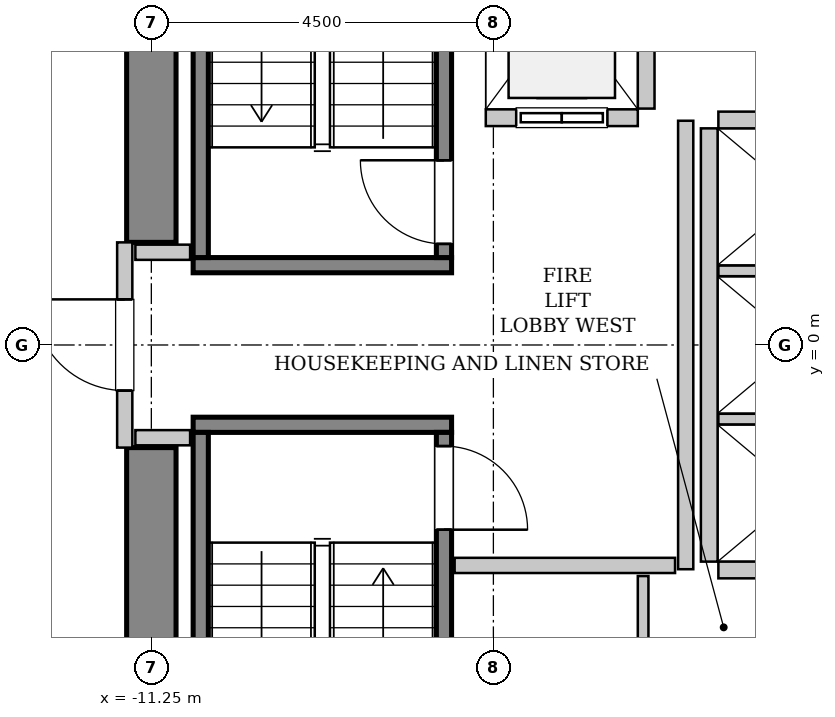
"""IFC4 building model, lengths in metres.
Left out: names, types, materials, properties, quantities, classifications, styles, units other than length and angle.
Written with IfcOpenShell. Run it as: python <this file> out.ifc"""

import sys

from ifc_helpers import new_model, si_unit, direction, frame, frame_2d, origin, place, context, subcontext, project, spatial, rectangle, extrude, source, transform, mapped, element, fill, save


model = new_model("IFC4")
c1 = context("Model", 3, precision=1e-05, world=origin(), true_north=direction((0.0, 1.0)))
c2 = subcontext(c1, "Body", "Model", "MODEL_VIEW")
j1 = project(units=[si_unit("LENGTHUNIT", "METRE"), si_unit("PLANEANGLEUNIT", "RADIAN")], contexts=[c1])
p1 = place(None, origin())
s1 = spatial("IfcSite", under=j1, at=p1, CompositionType="ELEMENT")
p2 = place(p1, origin())
s2 = spatial("IfcBuilding", under=s1, at=p2, CompositionType="ELEMENT")
p3 = place(p2, frame((0.0, 0.0, 55.8)))
s3 = spatial("IfcBuildingStorey", under=s2, at=p3, CompositionType="ELEMENT", Elevation=55.8)
m1 = source(origin(), c2, "Body", "SweptSolid", [
    extrude(rectangle(XDim=7.325, YDim=0.65, at=frame_2d((3.663, 0.0))), origin(), (0.0, 0.0, 1.0), 3.8),
])
for number, where, z_axis, x_axis in (
    (1, (-11.25, -8.675, 0.0), (0.0, 0.0, 1.0), (0.0, 1.0, 0.0)),
    (2, (-11.25, 1.35, 0.0), (0.0, 0.0, 1.0), (0.0, 1.0, 0.0)),
):
    element("IfcWall", number, at=place(p3, frame(where, z_axis=z_axis, x_axis=x_axis)), inside=s3, PredefinedType="SHEAR", context=c2, shape_type="MappedRepresentation", body=[
        mapped(m1, transform((0.0, 0.0, 0.0), x_axis=(1.0, 0.0, 0.0), y_axis=(0.0, 1.0, 0.0), z_axis=(0.0, 0.0, 1.0), scale=1.0)),
    ])
m2 = source(origin(), c2, "Body", "SweptSolid", [
    extrude(rectangle(XDim=3.4, YDim=0.2, at=frame_2d((1.7, 0.0))), origin(), (0.0, 0.0, 1.0), 3.8),
])
p4 = place(p3, frame((-7.3, 1.05, 0.0), z_axis=(0.0, 0.0, 1.0), x_axis=(-1.0, 0.0, 0.0)))
e3 = element("IfcWall", 3, at=p4, inside=s3, PredefinedType="SOLIDWALL", context=c2, shape_type="MappedRepresentation", body=[
    mapped(m2, transform((0.0, 0.0, 0.0), x_axis=(1.0, 0.0, 0.0), y_axis=(0.0, 1.0, 0.0), z_axis=(0.0, 0.0, 1.0), scale=1.0)),
])
m3 = source(origin(), c2, "Body", "SweptSolid", [
    extrude(rectangle(XDim=7.1, YDim=0.2, at=frame_2d((3.55, 0.0))), origin(), (0.0, 0.0, 1.0), 3.8),
])
p5 = place(p3, frame((-7.4, 1.15, 0.0), z_axis=(0.0, 0.0, 1.0), x_axis=(0.0, 1.0, 0.0)))
e4 = element("IfcWall", 4, at=p5, inside=s3, PredefinedType="SOLIDWALL", context=c2, shape_type="MappedRepresentation", body=[
    mapped(m3, transform((0.0, 0.0, 0.0), x_axis=(1.0, 0.0, 0.0), y_axis=(0.0, 1.0, 0.0), z_axis=(0.0, 0.0, 1.0), scale=1.0)),
])
p6 = place(p5, frame((0.18, 0.0, 0.0)))
e5 = element("IfcOpeningElement", 5, at=p6, cuts=e4, PredefinedType="OPENING", context=c2, shape_type="SweptSolid", body=[
    extrude(rectangle(XDim=1.1, YDim=2.15, at=frame_2d((0.55, 1.075))), frame((0.0, 0.11, 0.0), z_axis=(0.0, -1.0, 0.0), x_axis=(1.0, 0.0, 0.0)), (0.0, 0.0, 1.0), 0.22),
])
p7 = place(p3, frame((-10.6, 1.15, 0.0), z_axis=(0.0, 0.0, 1.0), x_axis=(0.0, 1.0, 0.0)))
e6 = element("IfcWall", 6, at=p7, inside=s3, PredefinedType="SOLIDWALL", context=c2, shape_type="MappedRepresentation", body=[
    mapped(m3, transform((0.0, 0.0, 0.0), x_axis=(1.0, 0.0, 0.0), y_axis=(0.0, 1.0, 0.0), z_axis=(0.0, 0.0, 1.0), scale=1.0)),
])
p8 = place(p3, frame((-10.7, -1.05, 0.0), z_axis=(0.0, 0.0, 1.0), x_axis=(1.0, 0.0, 0.0)))
e7 = element("IfcWall", 7, at=p8, inside=s3, PredefinedType="SOLIDWALL", context=c2, shape_type="MappedRepresentation", body=[
    mapped(m2, transform((0.0, 0.0, 0.0), x_axis=(1.0, 0.0, 0.0), y_axis=(0.0, 1.0, 0.0), z_axis=(0.0, 0.0, 1.0), scale=1.0)),
])
p9 = place(p3, frame((-10.6, -1.15, 0.0), z_axis=(0.0, 0.0, 1.0), x_axis=(0.0, -1.0, 0.0)))
e8 = element("IfcWall", 8, at=p9, inside=s3, PredefinedType="SOLIDWALL", context=c2, shape_type="MappedRepresentation", body=[
    mapped(m3, transform((0.0, 0.0, 0.0), x_axis=(1.0, 0.0, 0.0), y_axis=(0.0, 1.0, 0.0), z_axis=(0.0, 0.0, 1.0), scale=1.0)),
])
p10 = place(p3, frame((-7.4, -1.15, 0.0), z_axis=(0.0, 0.0, 1.0), x_axis=(0.0, -1.0, 0.0)))
e9 = element("IfcWall", 9, at=p10, inside=s3, PredefinedType="SOLIDWALL", context=c2, shape_type="MappedRepresentation", body=[
    mapped(m3, transform((0.0, 0.0, 0.0), x_axis=(1.0, 0.0, 0.0), y_axis=(0.0, 1.0, 0.0), z_axis=(0.0, 0.0, 1.0), scale=1.0)),
])
p11 = place(p10, frame((0.18, 0.0, 0.0)))
e10 = element("IfcOpeningElement", 10, at=p11, cuts=e9, PredefinedType="OPENING", context=c2, shape_type="SweptSolid", body=[
    extrude(rectangle(XDim=1.1, YDim=2.15, at=frame_2d((0.55, 1.075))), frame((0.0, 0.11, 0.0), z_axis=(0.0, -1.0, 0.0), x_axis=(1.0, 0.0, 0.0)), (0.0, 0.0, 1.0), 0.22),
])
m4 = source(origin(), c2, "Body", "SweptSolid", [
    extrude(rectangle(XDim=2.0, YDim=0.22, at=frame_2d((1.0, 0.0))), origin(), (0.0, 0.0, 1.0), 3.535),
])
p12 = place(p3, frame((-6.85, 2.99, 0.0), z_axis=(0.0, 0.0, 1.0), x_axis=(1.0, 0.0, 0.0)))
e11 = element("IfcWall", 11, at=p12, inside=s3, PredefinedType="SOLIDWALL", context=c2, shape_type="MappedRepresentation", body=[
    mapped(m4, transform((0.0, 0.0, 0.0), x_axis=(1.0, 0.0, 0.0), y_axis=(0.0, 1.0, 0.0), z_axis=(0.0, 0.0, 1.0), scale=1.0)),
])
p13 = place(p12, frame((0.4, 0.0, 0.0)))
e12 = element("IfcOpeningElement", 12, at=p13, cuts=e11, PredefinedType="OPENING", context=c2, shape_type="SweptSolid", body=[
    extrude(rectangle(XDim=1.2, YDim=2.2, at=frame_2d((0.6, 1.1))), frame((0.0, 0.12, 0.0), z_axis=(0.0, -1.0, 0.0), x_axis=(1.0, 0.0, 0.0)), (0.0, 0.0, 1.0), 0.24),
])
m5 = source(origin(), c2, "Body", "SweptSolid", [
    extrude(rectangle(XDim=2.68, YDim=0.22, at=frame_2d((1.34, 0.0))), origin(), (0.0, 0.0, 1.0), 3.535),
])
p14 = place(p3, frame((-4.74, 3.11, 0.0), z_axis=(0.0, 0.0, 1.0), x_axis=(0.0, 1.0, 0.0)))
e13 = element("IfcWall", 13, at=p14, inside=s3, PredefinedType="SOLIDWALL", context=c2, shape_type="MappedRepresentation", body=[
    mapped(m5, transform((0.0, 0.0, 0.0), x_axis=(1.0, 0.0, 0.0), y_axis=(0.0, 1.0, 0.0), z_axis=(0.0, 0.0, 1.0), scale=1.0)),
])
m6 = source(origin(), c2, "Body", "SweptSolid", [
    extrude(rectangle(XDim=5.7, YDim=0.22, at=frame_2d((2.85, 0.0))), origin(), (0.0, 0.0, 1.0), 3.535),
])
p15 = place(p3, frame((-3.91, 2.85, 0.0), z_axis=(0.0, 0.0, 1.0), x_axis=(0.0, -1.0, 0.0)))
e14 = element("IfcWall", 14, at=p15, inside=s3, PredefinedType="SOLIDWALL", context=c2, shape_type="MappedRepresentation", body=[
    mapped(m6, transform((0.0, 0.0, 0.0), x_axis=(1.0, 0.0, 0.0), y_axis=(0.0, 1.0, 0.0), z_axis=(0.0, 0.0, 1.0), scale=1.0)),
])
m7 = source(origin(), c2, "Body", "SweptSolid", [
    extrude(rectangle(XDim=2.13, YDim=0.22, at=frame_2d((1.065, 0.0))), origin(), (0.0, 0.0, 1.0), 3.535),
])
p16 = place(p3, frame((-3.79, -2.96, 0.0), z_axis=(0.0, 0.0, 1.0), x_axis=(1.0, 0.0, 0.0)))
e15 = element("IfcWall", 15, at=p16, inside=s3, PredefinedType="SOLIDWALL", context=c2, shape_type="MappedRepresentation", body=[
    mapped(m7, transform((0.0, 0.0, 0.0), x_axis=(1.0, 0.0, 0.0), y_axis=(0.0, 1.0, 0.0), z_axis=(0.0, 0.0, 1.0), scale=1.0)),
])
m8 = source(origin(), c2, "Body", "SweptSolid", [
    extrude(rectangle(XDim=2.13, YDim=0.14, at=frame_2d((1.065, 0.0))), origin(), (0.0, 0.0, 1.0), 3.535),
])
for number, where, z_axis, x_axis in (
    (16, (-3.79, -0.975, 0.0), (0.0, 0.0, 1.0), (1.0, 0.0, 0.0)),
    (17, (-3.79, 0.975, 0.0), (0.0, 0.0, 1.0), (1.0, 0.0, 0.0)),
):
    element("IfcWall", number, at=place(p3, frame(where, z_axis=z_axis, x_axis=x_axis)), inside=s3, PredefinedType="PARTITIONING", context=c2, shape_type="MappedRepresentation", body=[
        mapped(m8, transform((0.0, 0.0, 0.0), x_axis=(1.0, 0.0, 0.0), y_axis=(0.0, 1.0, 0.0), z_axis=(0.0, 0.0, 1.0), scale=1.0)),
    ])
p17 = place(p3, frame((-1.66, 2.96, 0.0), z_axis=(0.0, 0.0, 1.0), x_axis=(-1.0, 0.0, 0.0)))
e18 = element("IfcWall", 18, at=p17, inside=s3, PredefinedType="SOLIDWALL", context=c2, shape_type="MappedRepresentation", body=[
    mapped(m7, transform((0.0, 0.0, 0.0), x_axis=(1.0, 0.0, 0.0), y_axis=(0.0, 1.0, 0.0), z_axis=(0.0, 0.0, 1.0), scale=1.0)),
])
m9 = source(origin(), c2, "Body", "SweptSolid", [
    extrude(rectangle(XDim=2.7, YDim=0.2, at=frame_2d((1.35, 0.0))), origin(), (0.0, 0.0, 1.0), 2.425),
])
p18 = place(p3, frame((-11.6, -1.35, 0.0), z_axis=(0.0, 0.0, 1.0), x_axis=(0.0, 1.0, 0.0)))
e19 = element("IfcWall", 19, at=p18, inside=s3, PredefinedType="PARTITIONING", context=c2, shape_type="MappedRepresentation", body=[
    mapped(m9, transform((0.0, 0.0, 0.0), x_axis=(1.0, 0.0, 0.0), y_axis=(0.0, 1.0, 0.0), z_axis=(0.0, 0.0, 1.0), scale=1.0)),
])
p19 = place(p18, frame((0.75, 0.0, 0.0)))
e20 = element("IfcOpeningElement", 20, at=p19, cuts=e19, PredefinedType="OPENING", context=c2, shape_type="SweptSolid", body=[
    extrude(rectangle(XDim=1.2, YDim=2.15, at=frame_2d((0.6, 1.075))), frame((0.0, 0.11, 0.0), z_axis=(0.0, -1.0, 0.0), x_axis=(1.0, 0.0, 0.0)), (0.0, 0.0, 1.0), 0.22),
])
m10 = source(origin(), c2, "Body", "SweptSolid", [
    extrude(rectangle(XDim=5.9, YDim=0.2, at=frame_2d((2.95, 0.0))), origin(), (0.0, 0.0, 1.0), 3.535),
])
p20 = place(p3, frame((-4.22, -2.95, 0.0), z_axis=(0.0, 0.0, 1.0), x_axis=(0.0, 1.0, 0.0)))
e21 = element("IfcWall", 21, at=p20, inside=s3, PredefinedType="PARTITIONING", context=c2, shape_type="MappedRepresentation", body=[
    mapped(m10, transform((0.0, 0.0, 0.0), x_axis=(1.0, 0.0, 0.0), y_axis=(0.0, 1.0, 0.0), z_axis=(0.0, 0.0, 1.0), scale=1.0)),
])
m11 = source(origin(), c2, "Body", "SweptSolid", [
    extrude(rectangle(XDim=2.9, YDim=0.2, at=frame_2d((1.45, 0.0))), origin(), (0.0, 0.0, 1.0), 3.535),
])
p21 = place(p3, frame((-7.26, -2.9, 0.0), z_axis=(0.0, 0.0, 1.0), x_axis=(1.0, 0.0, 0.0)))
e22 = element("IfcWall", 22, at=p21, inside=s3, PredefinedType="PARTITIONING", context=c2, shape_type="MappedRepresentation", body=[
    mapped(m11, transform((0.0, 0.0, 0.0), x_axis=(1.0, 0.0, 0.0), y_axis=(0.0, 1.0, 0.0), z_axis=(0.0, 0.0, 1.0), scale=1.0)),
])
m12 = source(origin(), c2, "Body", "SweptSolid", [
    extrude(rectangle(XDim=0.72, YDim=0.2, at=frame_2d((0.36, 0.0))), origin(), (0.0, 0.0, 1.0), 3.535),
])
for number, where, z_axis, x_axis in (
    (23, (-11.46, 1.22, 0.0), (0.0, 0.0, 1.0), (1.0, 0.0, 0.0)),
    (24, (-11.46, -1.22, 0.0), (0.0, 0.0, 1.0), (1.0, 0.0, 0.0)),
):
    element("IfcWall", number, at=place(p3, frame(where, z_axis=z_axis, x_axis=x_axis)), inside=s3, PredefinedType="PARTITIONING", context=c2, shape_type="MappedRepresentation", body=[
        mapped(m12, transform((0.0, 0.0, 0.0), x_axis=(1.0, 0.0, 0.0), y_axis=(0.0, 1.0, 0.0), z_axis=(0.0, 0.0, 1.0), scale=1.0)),
    ])
m13 = source(origin(), c2, "Body", "SweptSolid", [
    extrude(rectangle(XDim=1.26, YDim=0.14, at=frame_2d((0.63, 0.0))), origin(), (0.0, 0.0, 1.0), 3.535),
])
p22 = place(p3, frame((-4.78, -4.3, 0.0), z_axis=(0.0, 0.0, 1.0), x_axis=(0.0, 1.0, 0.0)))
e25 = element("IfcWall", 25, at=p22, inside=s3, PredefinedType="PARTITIONING", context=c2, shape_type="MappedRepresentation", body=[
    mapped(m13, transform((0.0, 0.0, 0.0), x_axis=(1.0, 0.0, 0.0), y_axis=(0.0, 1.0, 0.0), z_axis=(0.0, 0.0, 1.0), scale=1.0)),
])
m14 = source(origin(), c2, "Body", "SweptSolid", [
    extrude(rectangle(XDim=1.1, YDim=2.15, at=frame_2d((0.55, 1.075))), frame((0.0, 0.025, 0.0), z_axis=(0.0, -1.0, 0.0), x_axis=(1.0, 0.0, 0.0)), (0.0, 0.0, 1.0), 0.05),
])
p23 = place(p6, origin())
e26 = element("IfcDoor", 26, at=p23, inside=s3, OperationType="SINGLE_SWING_RIGHT", PredefinedType="DOOR", context=c2, shape_type="MappedRepresentation", body=[
    mapped(m14, transform((0.0, 0.0, 0.0), x_axis=(1.0, 0.0, 0.0), y_axis=(0.0, 1.0, 0.0), z_axis=(0.0, 0.0, 1.0), scale=1.0)),
])
fill(e5, e26)
p24 = place(p11, origin())
e27 = element("IfcDoor", 27, at=p24, inside=s3, OperationType="SINGLE_SWING_RIGHT", PredefinedType="DOOR", context=c2, shape_type="MappedRepresentation", body=[
    mapped(m14, transform((0.0, 0.0, 0.0), x_axis=(1.0, 0.0, 0.0), y_axis=(0.0, 1.0, 0.0), z_axis=(0.0, 0.0, 1.0), scale=1.0)),
])
fill(e10, e27)
m15 = source(origin(), c2, "Body", "SweptSolid", [
    extrude(rectangle(XDim=1.2, YDim=2.2, at=frame_2d((0.6, 1.1))), frame((0.0, 0.025, 0.0), z_axis=(0.0, -1.0, 0.0), x_axis=(1.0, 0.0, 0.0)), (0.0, 0.0, 1.0), 0.05),
])
p25 = place(p13, origin())
e28 = element("IfcDoor", 28, at=p25, inside=s3, OperationType="SLIDING_TO_LEFT", PredefinedType="DOOR", context=c2, shape_type="MappedRepresentation", body=[
    mapped(m15, transform((0.0, 0.0, 0.0), x_axis=(1.0, 0.0, 0.0), y_axis=(0.0, 1.0, 0.0), z_axis=(0.0, 0.0, 1.0), scale=1.0)),
])
fill(e12, e28)
m16 = source(origin(), c2, "Body", "SweptSolid", [
    extrude(rectangle(XDim=1.2, YDim=2.15, at=frame_2d((0.6, 1.075))), frame((0.0, 0.025, 0.0), z_axis=(0.0, -1.0, 0.0), x_axis=(1.0, 0.0, 0.0)), (0.0, 0.0, 1.0), 0.05),
])
p26 = place(p19, origin())
e29 = element("IfcDoor", 29, at=p26, inside=s3, OperationType="SINGLE_SWING_RIGHT", PredefinedType="DOOR", context=c2, shape_type="MappedRepresentation", body=[
    mapped(m16, transform((0.0, 0.0, 0.0), x_axis=(1.0, 0.0, 0.0), y_axis=(0.0, 1.0, 0.0), z_axis=(0.0, 0.0, 1.0), scale=1.0)),
])
fill(e20, e29)
save(model, sys.argv[1])
